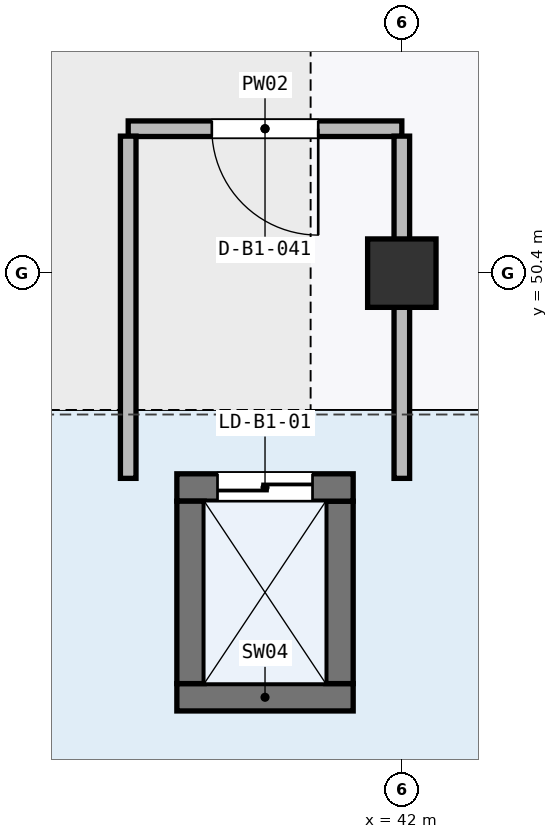
"""IFC4 building model, lengths in metres.
Left out: names, types, materials, properties, quantities, classifications, styles, units other than length and angle.
Written with IfcOpenShell. Run it as: python <this file> out.ifc"""

import sys

from ifc_helpers import new_model, si_unit, direction, frame, frame_2d, origin, origin_2d, place, context, subcontext, project, spatial, rectangle, extrude, element, fill, save


model = new_model("IFC4")
c1 = context("Model", 3, precision=1e-05, world=origin(), true_north=direction((0.0, 1.0)))
c2 = subcontext(c1, "Body", "Model", "MODEL_VIEW")
j1 = project(units=[si_unit("LENGTHUNIT", "METRE"), si_unit("PLANEANGLEUNIT", "RADIAN")], contexts=[c1])
p1 = place(None, origin())
s1 = spatial("IfcSite", under=j1, at=p1, CompositionType="ELEMENT")
p2 = place(p1, origin())
s2 = spatial("IfcBuilding", under=s1, at=p2, CompositionType="ELEMENT")
p3 = place(p2, frame((0.0, 0.0, -5.4)))
s3 = spatial("IfcBuildingStorey", under=s2, at=p3, CompositionType="ELEMENT", Elevation=-5.4)
p4 = place(p3, frame((42.0, 50.4, 0.0), z_axis=(0.0, 0.0, 1.0), x_axis=(1.0, 0.0, 0.0)))
e1 = element("IfcColumn", 1, at=p4, inside=s3, PredefinedType="COLUMN", context=c2, shape_type="SweptSolid", body=[
    extrude(rectangle(XDim=0.9, YDim=0.9, at=origin_2d()), origin(), (0.0, 0.0, 1.0), 5.4),
])
p5 = place(p3, frame((39.04, 44.82, 0.0), z_axis=(0.0, 0.0, 1.0), x_axis=(1.0, 0.0, 0.0)))
e2 = element("IfcWall", 2, at=p5, inside=s3, PredefinedType="SHEAR", context=c2, shape_type="SweptSolid", body=[
    extrude(rectangle(XDim=2.32, YDim=0.36, at=frame_2d((1.16, 0.0))), origin(), (0.0, 0.0, 1.0), 5.145),
])
p6 = place(p3, frame((41.18, 45.0, 0.0), z_axis=(0.0, 0.0, 1.0), x_axis=(0.0, 1.0, 0.0)))
e3 = element("IfcWall", 3, at=p6, inside=s3, PredefinedType="SHEAR", context=c2, shape_type="SweptSolid", body=[
    extrude(rectangle(XDim=2.4, YDim=0.36, at=frame_2d((1.2, 0.0))), origin(), (0.0, 0.0, 1.0), 5.145),
])
p7 = place(p3, frame((41.36, 47.58, 0.0), z_axis=(0.0, 0.0, 1.0), x_axis=(-1.0, 0.0, 0.0)))
e4 = element("IfcWall", 4, at=p7, inside=s3, PredefinedType="SHEAR", context=c2, shape_type="SweptSolid", body=[
    extrude(rectangle(XDim=2.32, YDim=0.36, at=frame_2d((1.16, 0.0))), origin(), (0.0, 0.0, 1.0), 5.145),
])
p8 = place(p7, frame((0.535, 0.0, 0.0)))
e5 = element("IfcOpeningElement", 5, at=p8, cuts=e4, PredefinedType="OPENING", context=c2, shape_type="SweptSolid", body=[
    extrude(rectangle(XDim=1.25, YDim=2.2, at=frame_2d((0.625, 1.1))), frame((0.0, 0.19, 0.0), z_axis=(0.0, -1.0, 0.0), x_axis=(1.0, 0.0, 0.0)), (0.0, 0.0, 1.0), 0.38),
])
p9 = place(p3, frame((39.22, 47.4, 0.0), z_axis=(0.0, 0.0, 1.0), x_axis=(0.0, -1.0, 0.0)))
e6 = element("IfcWall", 6, at=p9, inside=s3, PredefinedType="SHEAR", context=c2, shape_type="SweptSolid", body=[
    extrude(rectangle(XDim=2.4, YDim=0.36, at=frame_2d((1.2, 0.0))), origin(), (0.0, 0.0, 1.0), 5.145),
])
p10 = place(p3, frame((42.0, 52.3, 0.0), z_axis=(0.0, 0.0, 1.0), x_axis=(-1.0, 0.0, 0.0)))
e7 = element("IfcWall", 7, at=p10, inside=s3, PredefinedType="PARTITIONING", context=c2, shape_type="SweptSolid", body=[
    extrude(rectangle(XDim=3.6, YDim=0.205, at=frame_2d((1.8, 0.0))), origin(), (0.0, 0.0, 1.0), 5.145),
])
p11 = place(p10, frame((1.1, 0.0, 0.0)))
e8 = element("IfcOpeningElement", 8, at=p11, cuts=e7, PredefinedType="OPENING", context=c2, shape_type="SweptSolid", body=[
    extrude(rectangle(XDim=1.4, YDim=2.15, at=frame_2d((0.7, 1.075))), frame((0.0, 0.113, 0.0), z_axis=(0.0, -1.0, 0.0), x_axis=(1.0, 0.0, 0.0)), (0.0, 0.0, 1.0), 0.225),
])
p12 = place(p3, frame((42.0, 47.7, 0.0), z_axis=(0.0, 0.0, 1.0), x_axis=(0.0, 1.0, 0.0)))
e9 = element("IfcWall", 9, at=p12, inside=s3, PredefinedType="PARTITIONING", context=c2, shape_type="SweptSolid", body=[
    extrude(rectangle(XDim=4.502, YDim=0.205, at=frame_2d((2.251, 0.0))), origin(), (0.0, 0.0, 1.0), 4.322),
])
p13 = place(p3, frame((38.4, 52.202, 0.0), z_axis=(0.0, 0.0, 1.0), x_axis=(0.0, -1.0, 0.0)))
e10 = element("IfcWall", 10, at=p13, inside=s3, PredefinedType="PARTITIONING", context=c2, shape_type="SweptSolid", body=[
    extrude(rectangle(XDim=4.502, YDim=0.205, at=frame_2d((2.251, 0.0))), origin(), (0.0, 0.0, 1.0), 5.145),
])
p14 = place(p8, frame((1.25, 0.0, 0.0), z_axis=(0.0, 0.0, 1.0), x_axis=(-1.0, 0.0, 0.0)))
e11 = element("IfcDoor", 11, at=p14, inside=s3, OperationType="DOUBLE_DOOR_SLIDING", PredefinedType="DOOR", context=c2, shape_type="SweptSolid", body=[
    extrude(rectangle(XDim=1.25, YDim=2.2, at=frame_2d((0.625, 1.1))), frame((0.0, 0.025, 0.0), z_axis=(0.0, -1.0, 0.0), x_axis=(1.0, 0.0, 0.0)), (0.0, 0.0, 1.0), 0.05),
])
fill(e5, e11)
p15 = place(p11, origin())
e12 = element("IfcDoor", 12, at=p15, inside=s3, OperationType="SINGLE_SWING_LEFT", PredefinedType="DOOR", context=c2, shape_type="SweptSolid", body=[
    extrude(rectangle(XDim=1.4, YDim=2.15, at=frame_2d((0.7, 1.075))), frame((0.0, 0.025, 0.0), z_axis=(0.0, -1.0, 0.0), x_axis=(1.0, 0.0, 0.0)), (0.0, 0.0, 1.0), 0.05),
])
fill(e8, e12)
save(model, sys.argv[1])
